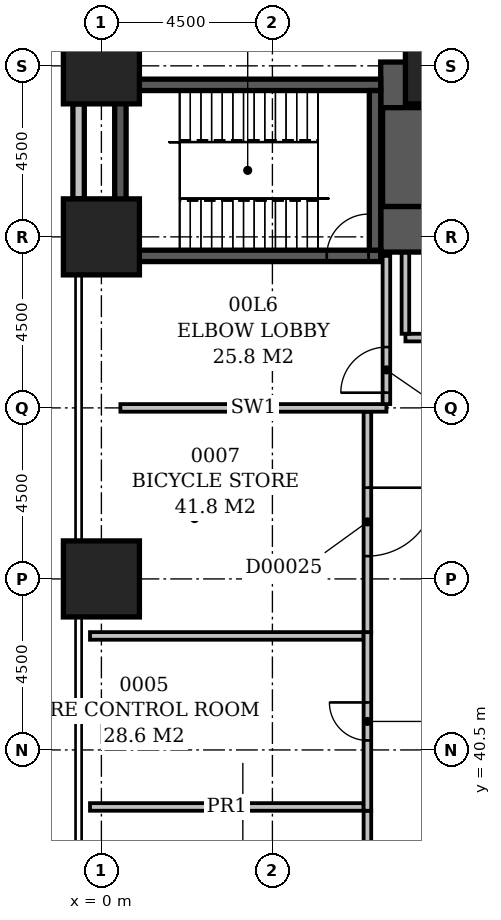
"""IFC4 building model, lengths in metres.
Left out: names, types, materials, properties, quantities, classifications, styles, units other than length and angle.
Written with IfcOpenShell. Run it as: python <this file> out.ifc"""

import sys

from ifc_helpers import new_model, si_unit, direction, frame, frame_2d, origin, origin_2d, place, context, subcontext, project, spatial, rectangle, extrude, element, fill, save


model = new_model("IFC4")
c1 = context("Model", 3, precision=1e-05, world=origin(), true_north=direction((0.0, 1.0)))
c2 = subcontext(c1, "Body", "Model", "MODEL_VIEW")
j1 = project(units=[si_unit("LENGTHUNIT", "METRE"), si_unit("PLANEANGLEUNIT", "RADIAN")], contexts=[c1])
p1 = place(None, origin())
s1 = spatial("IfcSite", under=j1, at=p1, CompositionType="ELEMENT")
p2 = place(p1, origin())
s2 = spatial("IfcBuilding", under=s1, at=p2, CompositionType="ELEMENT")
p3 = place(p2, origin())
s3 = spatial("IfcBuildingStorey", under=s2, at=p3, CompositionType="ELEMENT", Elevation=0.0)
p4 = place(p3, frame((0.35, 53.5, -0.45), z_axis=(0.0, 0.0, 1.0), x_axis=(1.0, 0.0, 0.0)))
e1 = element("IfcWall", 1, at=p4, inside=s3, PredefinedType="SHEAR", context=c2, shape_type="SweptSolid", body=[
    extrude(rectangle(XDim=7.0, YDim=0.3, at=frame_2d((3.5, 0.0))), origin(), (0.0, 0.0, 1.0), 8.85),
])
p5 = place(p4, frame((5.58, 0.0, 0.45)))
e2 = element("IfcOpeningElement", 2, at=p5, cuts=e1, PredefinedType="OPENING", context=c2, shape_type="SweptSolid", body=[
    extrude(rectangle(XDim=1.1, YDim=2.1, at=frame_2d((0.55, 1.05))), frame((0.0, 0.162, 0.0), z_axis=(0.0, -1.0, 0.0), x_axis=(1.0, 0.0, 0.0)), (0.0, 0.0, 1.0), 0.324),
])
p6 = place(p3, frame((0.35, 58.0, -0.45), z_axis=(0.0, 0.0, 1.0), x_axis=(1.0, 0.0, 0.0)))
e3 = element("IfcWall", 3, at=p6, inside=s3, PredefinedType="SHEAR", context=c2, shape_type="SweptSolid", body=[
    extrude(rectangle(XDim=7.0, YDim=0.3, at=frame_2d((3.5, 0.0))), origin(), (0.0, 0.0, 1.0), 8.85),
])
for number, where, z_axis, x_axis in (
    (4, (0.5, 53.65, -0.45), (0.0, 0.0, 1.0), (0.0, 1.0, 0.0)),
    (5, (7.2, 53.65, -0.45), (0.0, 0.0, 1.0), (0.0, 1.0, 0.0)),
):
    element("IfcWall", number, at=place(p3, frame(where, z_axis=z_axis, x_axis=x_axis)), inside=s3, PredefinedType="SHEAR", context=c2, shape_type="SweptSolid", body=[
        extrude(rectangle(XDim=4.2, YDim=0.3, at=frame_2d((2.1, 0.0))), origin(), (0.0, 0.0, 1.0), 8.85),
    ])
p7 = place(p3, frame((7.35, 54.2, -0.45), z_axis=(0.0, 0.0, 1.0), x_axis=(1.0, 0.0, 0.0)))
e6 = element("IfcWall", 6, at=p7, inside=s3, PredefinedType="SHEAR", context=c2, shape_type="SweptSolid", body=[
    extrude(rectangle(XDim=16.25, YDim=1.2, at=frame_2d((8.125, 0.0))), origin(), (0.0, 0.0, 1.0), 8.85),
])
p8 = place(p7, frame((1.35, 0.0, 0.45)))
e7 = element("IfcOpeningElement", 7, at=p8, cuts=e6, PredefinedType="OPENING", context=c2, shape_type="SweptSolid", body=[
    extrude(rectangle(XDim=1.1, YDim=2.1, at=frame_2d((0.55, 1.05))), frame((0.0, 0.612, 0.0), z_axis=(0.0, -1.0, 0.0), x_axis=(1.0, 0.0, 0.0)), (0.0, 0.0, 1.0), 1.224),
])
p9 = place(p7, frame((3.85, 0.0, 0.45)))
e8 = element("IfcOpeningElement", 8, at=p9, cuts=e6, PredefinedType="OPENING", context=c2, shape_type="SweptSolid", body=[
    extrude(rectangle(XDim=1.1, YDim=2.1, at=frame_2d((0.55, 1.05))), frame((0.0, 0.612, 0.0), z_axis=(0.0, -1.0, 0.0), x_axis=(1.0, 0.0, 0.0)), (0.0, 0.0, 1.0), 1.224),
])
p10 = place(p7, frame((6.35, 0.0, 0.45)))
e9 = element("IfcOpeningElement", 9, at=p10, cuts=e6, PredefinedType="OPENING", context=c2, shape_type="SweptSolid", body=[
    extrude(rectangle(XDim=1.1, YDim=2.1, at=frame_2d((0.55, 1.05))), frame((0.0, 0.612, 0.0), z_axis=(0.0, -1.0, 0.0), x_axis=(1.0, 0.0, 0.0)), (0.0, 0.0, 1.0), 1.224),
])
p11 = place(p7, frame((8.85, 0.0, 0.45)))
e10 = element("IfcOpeningElement", 10, at=p11, cuts=e6, PredefinedType="OPENING", context=c2, shape_type="SweptSolid", body=[
    extrude(rectangle(XDim=1.1, YDim=2.1, at=frame_2d((0.55, 1.05))), frame((0.0, 0.612, 0.0), z_axis=(0.0, -1.0, 0.0), x_axis=(1.0, 0.0, 0.0)), (0.0, 0.0, 1.0), 1.224),
])
p12 = place(p7, frame((11.35, 0.0, 0.45)))
e11 = element("IfcOpeningElement", 11, at=p12, cuts=e6, PredefinedType="OPENING", context=c2, shape_type="SweptSolid", body=[
    extrude(rectangle(XDim=1.1, YDim=2.1, at=frame_2d((0.55, 1.05))), frame((0.0, 0.612, 0.0), z_axis=(0.0, -1.0, 0.0), x_axis=(1.0, 0.0, 0.0)), (0.0, 0.0, 1.0), 1.224),
])
p13 = place(p7, frame((13.85, 0.0, 0.45)))
e12 = element("IfcOpeningElement", 12, at=p13, cuts=e6, PredefinedType="OPENING", context=c2, shape_type="SweptSolid", body=[
    extrude(rectangle(XDim=1.1, YDim=2.1, at=frame_2d((0.55, 1.05))), frame((0.0, 0.612, 0.0), z_axis=(0.0, -1.0, 0.0), x_axis=(1.0, 0.0, 0.0)), (0.0, 0.0, 1.0), 1.224),
])
p14 = place(p3, frame((7.35, 58.0, -0.45), z_axis=(0.0, 0.0, 1.0), x_axis=(1.0, 0.0, 0.0)))
e13 = element("IfcWall", 13, at=p14, inside=s3, PredefinedType="SHEAR", context=c2, shape_type="SweptSolid", body=[
    extrude(rectangle(XDim=16.25, YDim=1.2, at=frame_2d((8.125, 0.0))), origin(), (0.0, 0.0, 1.0), 8.85),
])
p15 = place(p3, frame((8.0, 54.8, -0.45), z_axis=(0.0, 0.0, 1.0), x_axis=(0.0, 1.0, 0.0)))
e14 = element("IfcWall", 14, at=p15, inside=s3, PredefinedType="SHEAR", context=c2, shape_type="SweptSolid", body=[
    extrude(rectangle(XDim=2.6, YDim=1.2, at=frame_2d((1.3, 0.0))), origin(), (0.0, 0.0, 1.0), 8.85),
])
for number, where, z_axis, x_axis in (
    (15, (0.0, 45.0, -0.45), (0.0, 0.0, 1.0), (1.0, 0.0, 0.0)),
    (16, (0.0, 54.0, -0.45), (0.0, 0.0, 1.0), (1.0, 0.0, 0.0)),
    (17, (0.0, 58.5, -0.45), (0.0, 0.0, 1.0), (1.0, 0.0, 0.0)),
    (18, (9.0, 58.5, -0.45), (0.0, 0.0, 1.0), (1.0, 0.0, 0.0)),
):
    element("IfcColumn", number, at=place(p3, frame(where, z_axis=z_axis, x_axis=x_axis)), inside=s3, PredefinedType="COLUMN", context=c2, shape_type="SweptSolid", body=[
        extrude(rectangle(XDim=2.0, YDim=2.0, at=origin_2d()), origin(), (0.0, 0.0, 1.0), 8.85),
    ])
p16 = place(p3, frame((-0.6, 57.5, 0.0), z_axis=(0.0, 0.0, 1.0), x_axis=(0.0, -1.0, 0.0)))
e19 = element("IfcWall", 19, at=p16, inside=s3, PredefinedType="STANDARD", context=c2, shape_type="SweptSolid", body=[
    extrude(rectangle(XDim=2.5, YDim=0.3, at=frame_2d((1.25, 0.0))), origin(), (0.0, 0.0, 1.0), 7.2),
])
p17 = place(p3, frame((8.0, 51.35, 0.0), z_axis=(0.0, 0.0, 1.0), x_axis=(1.0, 0.0, 0.0)))
e20 = element("IfcWall", 20, at=p17, inside=s3, PredefinedType="PARTITIONING", context=c2, shape_type="SweptSolid", body=[
    extrude(rectangle(XDim=15.0, YDim=0.2, at=frame_2d((7.5, 0.0))), origin(), (0.0, 0.0, 1.0), 8.4),
])
p18 = place(p17, frame((3.4, 0.0, 0.0)))
e21 = element("IfcOpeningElement", 21, at=p18, cuts=e20, PredefinedType="OPENING", context=c2, shape_type="SweptSolid", body=[
    extrude(rectangle(XDim=1.2, YDim=2.1, at=frame_2d((0.6, 1.05))), frame((0.0, 0.112, 0.0), z_axis=(0.0, -1.0, 0.0), x_axis=(1.0, 0.0, 0.0)), (0.0, 0.0, 1.0), 0.224),
])
p19 = place(p17, frame((9.4, 0.0, 0.0)))
e22 = element("IfcOpeningElement", 22, at=p19, cuts=e20, PredefinedType="OPENING", context=c2, shape_type="SweptSolid", body=[
    extrude(rectangle(XDim=1.2, YDim=2.1, at=frame_2d((0.6, 1.05))), frame((0.0, 0.112, 0.0), z_axis=(0.0, -1.0, 0.0), x_axis=(1.0, 0.0, 0.0)), (0.0, 0.0, 1.0), 0.224),
])
p20 = place(p3, frame((8.0, 51.45, 0.0), z_axis=(0.0, 0.0, 1.0), x_axis=(0.0, 1.0, 0.0)))
e23 = element("IfcWall", 23, at=p20, inside=s3, PredefinedType="PARTITIONING", context=c2, shape_type="SweptSolid", body=[
    extrude(rectangle(XDim=2.13, YDim=0.2, at=frame_2d((1.065, 0.0))), origin(), (0.0, 0.0, 1.0), 8.4),
])
p21 = place(p3, frame((0.5, 49.5, 0.0), z_axis=(0.0, 0.0, 1.0), x_axis=(1.0, 0.0, 0.0)))
e24 = element("IfcWall", 24, at=p21, inside=s3, PredefinedType="PARTITIONING", context=c2, shape_type="SweptSolid", body=[
    extrude(rectangle(XDim=7.0, YDim=0.2, at=frame_2d((3.5, 0.0))), origin(), (0.0, 0.0, 1.0), 8.4),
])
p22 = place(p3, frame((7.5, 49.6, 0.0), z_axis=(0.0, 0.0, 1.0), x_axis=(0.0, 1.0, 0.0)))
e25 = element("IfcWall", 25, at=p22, inside=s3, PredefinedType="PARTITIONING", context=c2, shape_type="SweptSolid", body=[
    extrude(rectangle(XDim=3.9, YDim=0.2, at=frame_2d((1.95, 0.0))), origin(), (0.0, 0.0, 1.0), 8.4),
])
p23 = place(p22, frame((0.3, 0.0, 0.0)))
e26 = element("IfcOpeningElement", 26, at=p23, cuts=e25, PredefinedType="OPENING", context=c2, shape_type="SweptSolid", body=[
    extrude(rectangle(XDim=1.2, YDim=2.1, at=frame_2d((0.6, 1.05))), frame((0.0, 0.112, 0.0), z_axis=(0.0, -1.0, 0.0), x_axis=(1.0, 0.0, 0.0)), (0.0, 0.0, 1.0), 0.224),
])
p24 = place(p3, frame((-0.3, 39.0, 0.0), z_axis=(0.0, 0.0, 1.0), x_axis=(1.0, 0.0, 0.0)))
e27 = element("IfcWall", 27, at=p24, inside=s3, PredefinedType="PARTITIONING", context=c2, shape_type="SweptSolid", body=[
    extrude(rectangle(XDim=7.2, YDim=0.2, at=frame_2d((3.6, 0.0))), origin(), (0.0, 0.0, 1.0), 8.4),
])
p25 = place(p3, frame((7.0, 38.9, 0.0), z_axis=(0.0, 0.0, 1.0), x_axis=(0.0, -1.0, 0.0)))
e28 = element("IfcWall", 28, at=p25, inside=s3, PredefinedType="PARTITIONING", context=c2, shape_type="SweptSolid", body=[
    extrude(rectangle(XDim=4.3, YDim=0.2, at=frame_2d((2.15, 0.0))), origin(), (0.0, 0.0, 1.0), 8.4),
])
p26 = place(p25, frame((1.25, 0.0, 0.0)))
e29 = element("IfcOpeningElement", 29, at=p26, cuts=e28, PredefinedType="OPENING", context=c2, shape_type="SweptSolid", body=[
    extrude(rectangle(XDim=1.0, YDim=2.1, at=frame_2d((0.5, 1.05))), frame((0.0, 0.112, 0.0), z_axis=(0.0, -1.0, 0.0), x_axis=(1.0, 0.0, 0.0)), (0.0, 0.0, 1.0), 0.224),
])
p27 = place(p3, frame((-0.3, 43.5, 0.0), z_axis=(0.0, 0.0, 1.0), x_axis=(1.0, 0.0, 0.0)))
e30 = element("IfcWall", 30, at=p27, inside=s3, PredefinedType="PARTITIONING", context=c2, shape_type="SweptSolid", body=[
    extrude(rectangle(XDim=7.2, YDim=0.2, at=frame_2d((3.6, 0.0))), origin(), (0.0, 0.0, 1.0), 8.4),
])
p28 = place(p3, frame((7.0, 43.6, 0.0), z_axis=(0.0, 0.0, 1.0), x_axis=(0.0, -1.0, 0.0)))
e31 = element("IfcWall", 31, at=p28, inside=s3, PredefinedType="PARTITIONING", context=c2, shape_type="SweptSolid", body=[
    extrude(rectangle(XDim=4.7, YDim=0.2, at=frame_2d((2.35, 0.0))), origin(), (0.0, 0.0, 1.0), 8.4),
])
p29 = place(p28, frame((1.85, 0.0, 0.0)))
e32 = element("IfcOpeningElement", 32, at=p29, cuts=e31, PredefinedType="OPENING", context=c2, shape_type="SweptSolid", body=[
    extrude(rectangle(XDim=1.0, YDim=2.1, at=frame_2d((0.5, 1.05))), frame((0.0, 0.112, 0.0), z_axis=(0.0, -1.0, 0.0), x_axis=(1.0, 0.0, 0.0)), (0.0, 0.0, 1.0), 0.224),
])
p30 = place(p3, frame((7.0, 49.4, 0.0), z_axis=(0.0, 0.0, 1.0), x_axis=(0.0, -1.0, 0.0)))
e33 = element("IfcWall", 33, at=p30, inside=s3, PredefinedType="PARTITIONING", context=c2, shape_type="SweptSolid", body=[
    extrude(rectangle(XDim=5.8, YDim=0.2, at=frame_2d((2.9, 0.0))), origin(), (0.0, 0.0, 1.0), 8.4),
])
p31 = place(p30, frame((2.0, 0.0, 0.0)))
e34 = element("IfcOpeningElement", 34, at=p31, cuts=e33, PredefinedType="OPENING", context=c2, shape_type="SweptSolid", body=[
    extrude(rectangle(XDim=1.8, YDim=2.4, at=frame_2d((0.9, 1.2))), frame((0.0, 0.112, 0.0), z_axis=(0.0, -1.0, 0.0), x_axis=(1.0, 0.0, 0.0)), (0.0, 0.0, 1.0), 0.224),
])
p32 = place(p23, origin())
e35 = element("IfcDoor", 35, at=p32, inside=s3, OperationType="SINGLE_SWING_LEFT", PredefinedType="DOOR", context=c2, shape_type="SweptSolid", body=[
    extrude(rectangle(XDim=1.2, YDim=2.1, at=frame_2d((0.6, 1.05))), frame((0.0, 0.025, 0.0), z_axis=(0.0, -1.0, 0.0), x_axis=(1.0, 0.0, 0.0)), (0.0, 0.0, 1.0), 0.05),
])
fill(e26, e35)
p33 = place(p5, frame((1.1, 0.0, 0.0), z_axis=(0.0, 0.0, 1.0), x_axis=(-1.0, 0.0, 0.0)))
e36 = element("IfcDoor", 36, at=p33, inside=s3, OperationType="SINGLE_SWING_LEFT", PredefinedType="DOOR", context=c2, shape_type="SweptSolid", body=[
    extrude(rectangle(XDim=1.1, YDim=2.1, at=frame_2d((0.55, 1.05))), frame((0.0, 0.025, 0.0), z_axis=(0.0, -1.0, 0.0), x_axis=(1.0, 0.0, 0.0)), (0.0, 0.0, 1.0), 0.05),
])
fill(e2, e36)
p34 = place(p29, frame((1.0, 0.0, 0.0), z_axis=(0.0, 0.0, 1.0), x_axis=(-1.0, 0.0, 0.0)))
e37 = element("IfcDoor", 37, at=p34, inside=s3, OperationType="SINGLE_SWING_RIGHT", PredefinedType="DOOR", context=c2, shape_type="SweptSolid", body=[
    extrude(rectangle(XDim=1.0, YDim=2.1, at=frame_2d((0.5, 1.05))), frame((0.0, 0.025, 0.0), z_axis=(0.0, -1.0, 0.0), x_axis=(1.0, 0.0, 0.0)), (0.0, 0.0, 1.0), 0.05),
])
fill(e32, e37)
p35 = place(p31, origin())
e38 = element("IfcDoor", 38, at=p35, inside=s3, OperationType="DOUBLE_DOOR_SINGLE_SWING", PredefinedType="DOOR", context=c2, shape_type="SweptSolid", body=[
    extrude(rectangle(XDim=1.8, YDim=2.4, at=frame_2d((0.9, 1.2))), frame((0.0, 0.025, 0.0), z_axis=(0.0, -1.0, 0.0), x_axis=(1.0, 0.0, 0.0)), (0.0, 0.0, 1.0), 0.05),
])
fill(e34, e38)
save(model, sys.argv[1])
